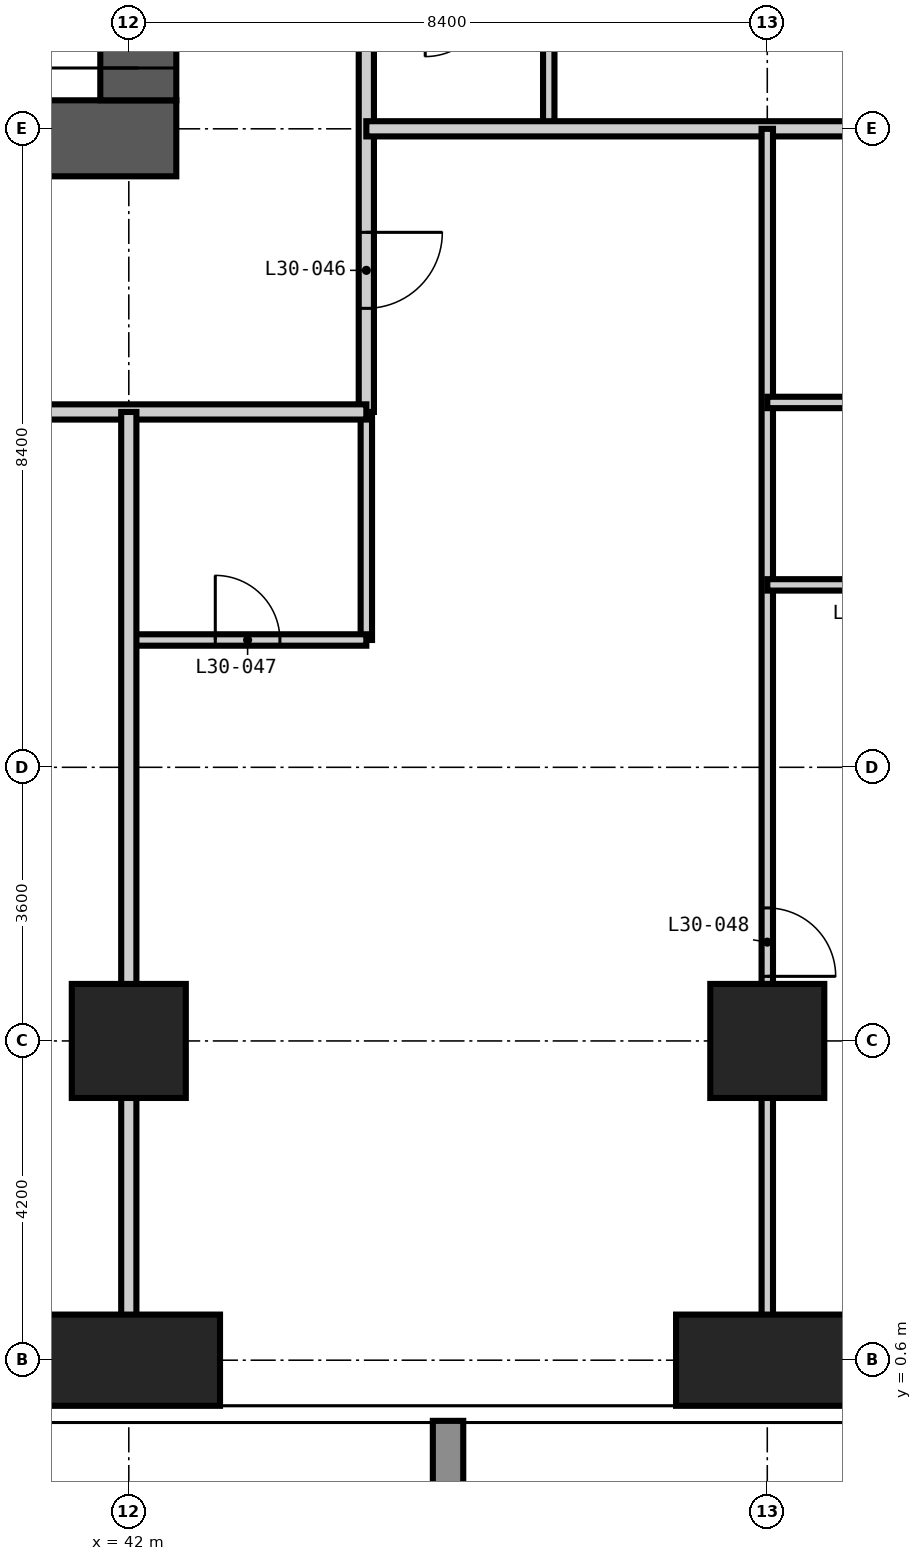
"""IFC4 building model, lengths in metres.
Left out: names, types, materials, properties, quantities, classifications, styles, units other than length and angle.
Written with IfcOpenShell. Run it as: python <this file> out.ifc"""

import sys

from ifc_helpers import new_model, si_unit, direction, frame, frame_2d, origin, origin_2d, place, context, subcontext, project, spatial, rectangle, extrude, element, fill, save


model = new_model("IFC4")
c1 = context("Model", 3, precision=1e-05, world=origin(), true_north=direction((0.0, 1.0)))
c2 = subcontext(c1, "Body", "Model", "MODEL_VIEW")
j1 = project(units=[si_unit("LENGTHUNIT", "METRE"), si_unit("PLANEANGLEUNIT", "RADIAN")], contexts=[c1])
p1 = place(None, origin())
s1 = spatial("IfcSite", under=j1, at=p1, CompositionType="ELEMENT")
p2 = place(p1, origin())
s2 = spatial("IfcBuilding", under=s1, at=p2, CompositionType="ELEMENT")
p3 = place(p2, frame((0.0, 0.0, 118.8)))
s3 = spatial("IfcBuildingStorey", under=s2, at=p3, CompositionType="ELEMENT", Elevation=118.8)
p4 = place(p3, frame((42.0, 0.6, -0.35), z_axis=(0.0, 0.0, 1.0), x_axis=(1.0, 0.0, 0.0)))
e1 = element("IfcColumn", 1, at=p4, inside=s3, PredefinedType="COLUMN", context=c2, shape_type="SweptSolid", body=[
    extrude(rectangle(XDim=2.4, YDim=1.2, at=origin_2d()), origin(), (0.0, 0.0, 1.0), 3.6),
])
p5 = place(p3, frame((42.0, 4.8, -0.35), z_axis=(0.0, 0.0, 1.0), x_axis=(1.0, 0.0, 0.0)))
e2 = element("IfcColumn", 2, at=p5, inside=s3, PredefinedType="COLUMN", context=c2, shape_type="SweptSolid", body=[
    extrude(rectangle(XDim=1.5, YDim=1.5, at=origin_2d()), origin(), (0.0, 0.0, 1.0), 3.6),
])
p6 = place(p3, frame((50.4, 0.6, -0.35), z_axis=(0.0, 0.0, 1.0), x_axis=(1.0, 0.0, 0.0)))
e3 = element("IfcColumn", 3, at=p6, inside=s3, PredefinedType="COLUMN", context=c2, shape_type="SweptSolid", body=[
    extrude(rectangle(XDim=2.4, YDim=1.2, at=origin_2d()), origin(), (0.0, 0.0, 1.0), 3.6),
])
p7 = place(p3, frame((50.4, 4.8, -0.35), z_axis=(0.0, 0.0, 1.0), x_axis=(1.0, 0.0, 0.0)))
e4 = element("IfcColumn", 4, at=p7, inside=s3, PredefinedType="COLUMN", context=c2, shape_type="SweptSolid", body=[
    extrude(rectangle(XDim=1.5, YDim=1.5, at=origin_2d()), origin(), (0.0, 0.0, 1.0), 3.6),
])
p8 = place(p3, frame((16.175, 16.675, -0.35), z_axis=(0.0, 0.0, 1.0), x_axis=(1.0, 0.0, 0.0)))
e5 = element("IfcWall", 5, at=p8, inside=s3, PredefinedType="SHEAR", context=c2, shape_type="SweptSolid", body=[
    extrude(rectangle(XDim=26.45, YDim=1.0, at=frame_2d((13.225, 0.0))), origin(), (0.0, 0.0, 1.0), 3.6),
])
p9 = place(p8, frame((12.725, 0.0, 0.35)))
e6 = element("IfcOpeningElement", 6, at=p9, cuts=e5, PredefinedType="OPENING", context=c2, shape_type="SweptSolid", body=[
    extrude(rectangle(XDim=1.0, YDim=2.1, at=frame_2d((0.5, 1.05))), frame((0.0, 0.51, 0.0), z_axis=(0.0, -1.0, 0.0), x_axis=(1.0, 0.0, 0.0)), (0.0, 0.0, 1.0), 1.02),
])
p10 = place(p8, frame((19.025, 0.0, 0.35)))
e7 = element("IfcOpeningElement", 7, at=p10, cuts=e5, PredefinedType="OPENING", context=c2, shape_type="SweptSolid", body=[
    extrude(rectangle(XDim=1.0, YDim=2.1, at=frame_2d((0.5, 1.05))), frame((0.0, 0.51, 0.0), z_axis=(0.0, -1.0, 0.0), x_axis=(1.0, 0.0, 0.0)), (0.0, 0.0, 1.0), 1.02),
])
p11 = place(p3, frame((42.125, 17.175, -0.35), z_axis=(0.0, 0.0, 1.0), x_axis=(0.0, 1.0, 0.0)))
e8 = element("IfcWall", 8, at=p11, inside=s3, PredefinedType="SHEAR", context=c2, shape_type="SweptSolid", body=[
    extrude(rectangle(XDim=24.45, YDim=1.0, at=frame_2d((12.225, 0.0))), origin(), (0.0, 0.0, 1.0), 3.6),
])
p12 = place(p11, frame((0.425, 0.0, 0.35)))
e9 = element("IfcOpeningElement", 9, at=p12, cuts=e8, PredefinedType="OPENING", context=c2, shape_type="SweptSolid", body=[
    extrude(rectangle(XDim=1.2, YDim=2.2, at=frame_2d((0.6, 1.1))), frame((0.0, 0.51, 0.0), z_axis=(0.0, -1.0, 0.0), x_axis=(1.0, 0.0, 0.0)), (0.0, 0.0, 1.0), 1.02),
])
p13 = place(p11, frame((11.325, 0.0, 0.35)))
e10 = element("IfcOpeningElement", 10, at=p13, cuts=e8, PredefinedType="OPENING", context=c2, shape_type="SweptSolid", body=[
    extrude(rectangle(XDim=1.8, YDim=2.2, at=frame_2d((0.9, 1.1))), frame((0.0, 0.51, 0.0), z_axis=(0.0, -1.0, 0.0), x_axis=(1.0, 0.0, 0.0)), (0.0, 0.0, 1.0), 1.02),
])
p14 = place(p11, frame((20.125, 0.0, 0.35)))
e11 = element("IfcOpeningElement", 11, at=p14, cuts=e8, PredefinedType="OPENING", context=c2, shape_type="SweptSolid", body=[
    extrude(rectangle(XDim=1.0, YDim=2.1, at=frame_2d((0.5, 1.05))), frame((0.0, 0.51, 0.0), z_axis=(0.0, -1.0, 0.0), x_axis=(1.0, 0.0, 0.0)), (0.0, 0.0, 1.0), 1.02),
])
p15 = place(p3, frame((45.125, 10.075, 0.0), z_axis=(0.0, 0.0, 1.0), x_axis=(0.0, 1.0, 0.0)))
e12 = element("IfcWall", 12, at=p15, inside=s3, PredefinedType="PARTITIONING", context=c2, shape_type="SweptSolid", body=[
    extrude(rectangle(XDim=3.0, YDim=0.15, at=frame_2d((1.5, 0.0))), origin(), (0.0, 0.0, 1.0), 3.25),
])
p16 = place(p3, frame((47.525, 16.8, 0.0), z_axis=(0.0, 0.0, 1.0), x_axis=(0.0, 1.0, 0.0)))
e13 = element("IfcWall", 13, at=p16, inside=s3, PredefinedType="PARTITIONING", context=c2, shape_type="SweptSolid", body=[
    extrude(rectangle(XDim=1.8, YDim=0.15, at=frame_2d((0.9, 0.0))), origin(), (0.0, 0.0, 1.0), 3.25),
])
p17 = place(p3, frame((42.0, 10.075, 0.0), z_axis=(0.0, 0.0, 1.0), x_axis=(1.0, 0.0, 0.0)))
e14 = element("IfcWall", 14, at=p17, inside=s3, PredefinedType="PARTITIONING", context=c2, shape_type="SweptSolid", body=[
    extrude(rectangle(XDim=3.125, YDim=0.15, at=frame_2d((1.562, 0.0))), origin(), (0.0, 0.0, 1.0), 3.25),
])
p18 = place(p17, frame((1.138, 0.0, 0.0)))
e15 = element("IfcOpeningElement", 15, at=p18, cuts=e14, PredefinedType="OPENING", context=c2, shape_type="SweptSolid", body=[
    extrude(rectangle(XDim=0.85, YDim=2.1, at=frame_2d((0.425, 1.05))), frame((0.0, 0.085, 0.0), z_axis=(0.0, -1.0, 0.0), x_axis=(1.0, 0.0, 0.0)), (0.0, 0.0, 1.0), 0.17),
])
p19 = place(p3, frame((45.125, 44.525, 0.0), z_axis=(0.0, 0.0, 1.0), x_axis=(0.0, -1.0, 0.0)))
e16 = element("IfcWall", 16, at=p19, inside=s3, PredefinedType="PARTITIONING", context=c2, shape_type="SweptSolid", body=[
    extrude(rectangle(XDim=31.45, YDim=0.2, at=frame_2d((15.725, 0.0))), origin(), (0.0, 0.0, 1.0), 3.25),
])
p20 = place(p19, frame((24.225, 0.0, 0.0)))
e17 = element("IfcOpeningElement", 17, at=p20, cuts=e16, PredefinedType="OPENING", context=c2, shape_type="SweptSolid", body=[
    extrude(rectangle(XDim=1.0, YDim=2.2, at=frame_2d((0.5, 1.1))), frame((0.0, 0.11, 0.0), z_axis=(0.0, -1.0, 0.0), x_axis=(1.0, 0.0, 0.0)), (0.0, 0.0, 1.0), 0.22),
])
p21 = place(p19, frame((15.825, 0.0, 0.0)))
e18 = element("IfcOpeningElement", 18, at=p21, cuts=e16, PredefinedType="OPENING", context=c2, shape_type="SweptSolid", body=[
    extrude(rectangle(XDim=1.0, YDim=2.2, at=frame_2d((0.5, 1.1))), frame((0.0, 0.11, 0.0), z_axis=(0.0, -1.0, 0.0), x_axis=(1.0, 0.0, 0.0)), (0.0, 0.0, 1.0), 0.22),
])
p22 = place(p19, frame((7.425, 0.0, 0.0)))
e19 = element("IfcOpeningElement", 19, at=p22, cuts=e16, PredefinedType="OPENING", context=c2, shape_type="SweptSolid", body=[
    extrude(rectangle(XDim=1.0, YDim=2.2, at=frame_2d((0.5, 1.1))), frame((0.0, 0.11, 0.0), z_axis=(0.0, -1.0, 0.0), x_axis=(1.0, 0.0, 0.0)), (0.0, 0.0, 1.0), 0.22),
])
p23 = place(p19, frame((29.087, 0.0, 0.0)))
e20 = element("IfcOpeningElement", 20, at=p23, cuts=e16, PredefinedType="OPENING", context=c2, shape_type="SweptSolid", body=[
    extrude(rectangle(XDim=1.0, YDim=2.2, at=frame_2d((0.5, 1.1))), frame((0.0, 0.11, 0.0), z_axis=(0.0, -1.0, 0.0), x_axis=(1.0, 0.0, 0.0)), (0.0, 0.0, 1.0), 0.22),
])
p24 = place(p19, frame((0.762, 0.0, 0.0)))
e21 = element("IfcOpeningElement", 21, at=p24, cuts=e16, PredefinedType="OPENING", context=c2, shape_type="SweptSolid", body=[
    extrude(rectangle(XDim=1.0, YDim=2.2, at=frame_2d((0.5, 1.1))), frame((0.0, 0.11, 0.0), z_axis=(0.0, -1.0, 0.0), x_axis=(1.0, 0.0, 0.0)), (0.0, 0.0, 1.0), 0.22),
])
p25 = place(p3, frame((45.125, 13.075, 0.0), z_axis=(0.0, 0.0, 1.0), x_axis=(-1.0, 0.0, 0.0)))
e22 = element("IfcWall", 22, at=p25, inside=s3, PredefinedType="PARTITIONING", context=c2, shape_type="SweptSolid", body=[
    extrude(rectangle(XDim=32.525, YDim=0.2, at=frame_2d((16.262, 0.0))), origin(), (0.0, 0.0, 1.0), 3.25),
])
p26 = place(p25, frame((22.425, 0.0, 0.0)))
e23 = element("IfcOpeningElement", 23, at=p26, cuts=e22, PredefinedType="OPENING", context=c2, shape_type="SweptSolid", body=[
    extrude(rectangle(XDim=1.0, YDim=2.2, at=frame_2d((0.5, 1.1))), frame((0.0, 0.11, 0.0), z_axis=(0.0, -1.0, 0.0), x_axis=(1.0, 0.0, 0.0)), (0.0, 0.0, 1.0), 0.22),
])
p27 = place(p25, frame((14.025, 0.0, 0.0)))
e24 = element("IfcOpeningElement", 24, at=p27, cuts=e22, PredefinedType="OPENING", context=c2, shape_type="SweptSolid", body=[
    extrude(rectangle(XDim=1.0, YDim=2.2, at=frame_2d((0.5, 1.1))), frame((0.0, 0.11, 0.0), z_axis=(0.0, -1.0, 0.0), x_axis=(1.0, 0.0, 0.0)), (0.0, 0.0, 1.0), 0.22),
])
p28 = place(p25, frame((5.625, 0.0, 0.0)))
e25 = element("IfcOpeningElement", 25, at=p28, cuts=e22, PredefinedType="OPENING", context=c2, shape_type="SweptSolid", body=[
    extrude(rectangle(XDim=1.0, YDim=2.2, at=frame_2d((0.5, 1.1))), frame((0.0, 0.11, 0.0), z_axis=(0.0, -1.0, 0.0), x_axis=(1.0, 0.0, 0.0)), (0.0, 0.0, 1.0), 0.22),
])
p29 = place(p3, frame((42.0, -0.018, 0.0), z_axis=(0.0, 0.0, 1.0), x_axis=(0.0, 1.0, 0.0)))
e26 = element("IfcWall", 26, at=p29, inside=s3, PredefinedType="PARTITIONING", context=c2, shape_type="SweptSolid", body=[
    extrude(rectangle(XDim=13.093, YDim=0.2, at=frame_2d((6.546, 0.0))), origin(), (0.0, 0.0, 1.0), 3.25),
])
p30 = place(p3, frame((45.125, 16.8, 0.0), z_axis=(0.0, 0.0, 1.0), x_axis=(1.0, 0.0, 0.0)))
e27 = element("IfcWall", 27, at=p30, inside=s3, PredefinedType="PARTITIONING", context=c2, shape_type="SweptSolid", body=[
    extrude(rectangle(XDim=9.493, YDim=0.2, at=frame_2d((4.747, 0.0))), origin(), (0.0, 0.0, 1.0), 3.25),
])
p31 = place(p3, frame((50.4, -0.018, 0.0), z_axis=(0.0, 0.0, 1.0), x_axis=(0.0, 1.0, 0.0)))
e28 = element("IfcWall", 28, at=p31, inside=s3, PredefinedType="PARTITIONING", context=c2, shape_type="SweptSolid", body=[
    extrude(rectangle(XDim=16.818, YDim=0.15, at=frame_2d((8.409, 0.0))), origin(), (0.0, 0.0, 1.0), 3.25),
])
p32 = place(p31, frame((5.668, 0.0, 0.0)))
e29 = element("IfcOpeningElement", 29, at=p32, cuts=e28, PredefinedType="OPENING", context=c2, shape_type="SweptSolid", body=[
    extrude(rectangle(XDim=0.9, YDim=2.1, at=frame_2d((0.45, 1.05))), frame((0.0, 0.085, 0.0), z_axis=(0.0, -1.0, 0.0), x_axis=(1.0, 0.0, 0.0)), (0.0, 0.0, 1.0), 0.17),
])
p33 = place(p3, frame((50.4, 10.8, 0.0), z_axis=(0.0, 0.0, 1.0), x_axis=(1.0, 0.0, 0.0)))
e30 = element("IfcWall", 30, at=p33, inside=s3, PredefinedType="PARTITIONING", context=c2, shape_type="SweptSolid", body=[
    extrude(rectangle(XDim=3.0, YDim=0.15, at=frame_2d((1.5, 0.0))), origin(), (0.0, 0.0, 1.0), 3.25),
])
p34 = place(p33, frame((1.05, 0.0, 0.0)))
e31 = element("IfcOpeningElement", 31, at=p34, cuts=e30, PredefinedType="OPENING", context=c2, shape_type="SweptSolid", body=[
    extrude(rectangle(XDim=0.9, YDim=2.1, at=frame_2d((0.45, 1.05))), frame((0.0, 0.085, 0.0), z_axis=(0.0, -1.0, 0.0), x_axis=(1.0, 0.0, 0.0)), (0.0, 0.0, 1.0), 0.17),
])
p35 = place(p3, frame((50.4, 13.2, 0.0), z_axis=(0.0, 0.0, 1.0), x_axis=(1.0, 0.0, 0.0)))
e32 = element("IfcWall", 32, at=p35, inside=s3, PredefinedType="PARTITIONING", context=c2, shape_type="SweptSolid", body=[
    extrude(rectangle(XDim=3.0, YDim=0.15, at=frame_2d((1.5, 0.0))), origin(), (0.0, 0.0, 1.0), 3.25),
])
p36 = place(p12, origin())
e33 = element("IfcDoor", 33, at=p36, inside=s3, OperationType="SINGLE_SWING_LEFT", PredefinedType="DOOR", context=c2, shape_type="SweptSolid", body=[
    extrude(rectangle(XDim=1.2, YDim=2.2, at=frame_2d((0.6, 1.1))), frame((0.0, 0.025, 0.0), z_axis=(0.0, -1.0, 0.0), x_axis=(1.0, 0.0, 0.0)), (0.0, 0.0, 1.0), 0.05),
])
fill(e9, e33)
p37 = place(p23, origin())
e34 = element("IfcDoor", 34, at=p37, inside=s3, OperationType="SINGLE_SWING_LEFT", PredefinedType="DOOR", context=c2, shape_type="SweptSolid", body=[
    extrude(rectangle(XDim=1.0, YDim=2.2, at=frame_2d((0.5, 1.1))), frame((0.0, 0.025, 0.0), z_axis=(0.0, -1.0, 0.0), x_axis=(1.0, 0.0, 0.0)), (0.0, 0.0, 1.0), 0.05),
])
fill(e20, e34)
p38 = place(p18, origin())
e35 = element("IfcDoor", 35, at=p38, inside=s3, OperationType="SINGLE_SWING_LEFT", PredefinedType="DOOR", context=c2, shape_type="SweptSolid", body=[
    extrude(rectangle(XDim=0.85, YDim=2.1, at=frame_2d((0.425, 1.05))), frame((0.0, 0.025, 0.0), z_axis=(0.0, -1.0, 0.0), x_axis=(1.0, 0.0, 0.0)), (0.0, 0.0, 1.0), 0.05),
])
fill(e15, e35)
p39 = place(p32, frame((0.9, 0.0, 0.0), z_axis=(0.0, 0.0, 1.0), x_axis=(-1.0, 0.0, 0.0)))
e36 = element("IfcDoor", 36, at=p39, inside=s3, OperationType="SINGLE_SWING_RIGHT", PredefinedType="DOOR", context=c2, shape_type="SweptSolid", body=[
    extrude(rectangle(XDim=0.9, YDim=2.1, at=frame_2d((0.45, 1.05))), frame((0.0, 0.025, 0.0), z_axis=(0.0, -1.0, 0.0), x_axis=(1.0, 0.0, 0.0)), (0.0, 0.0, 1.0), 0.05),
])
fill(e29, e36)
save(model, sys.argv[1])
